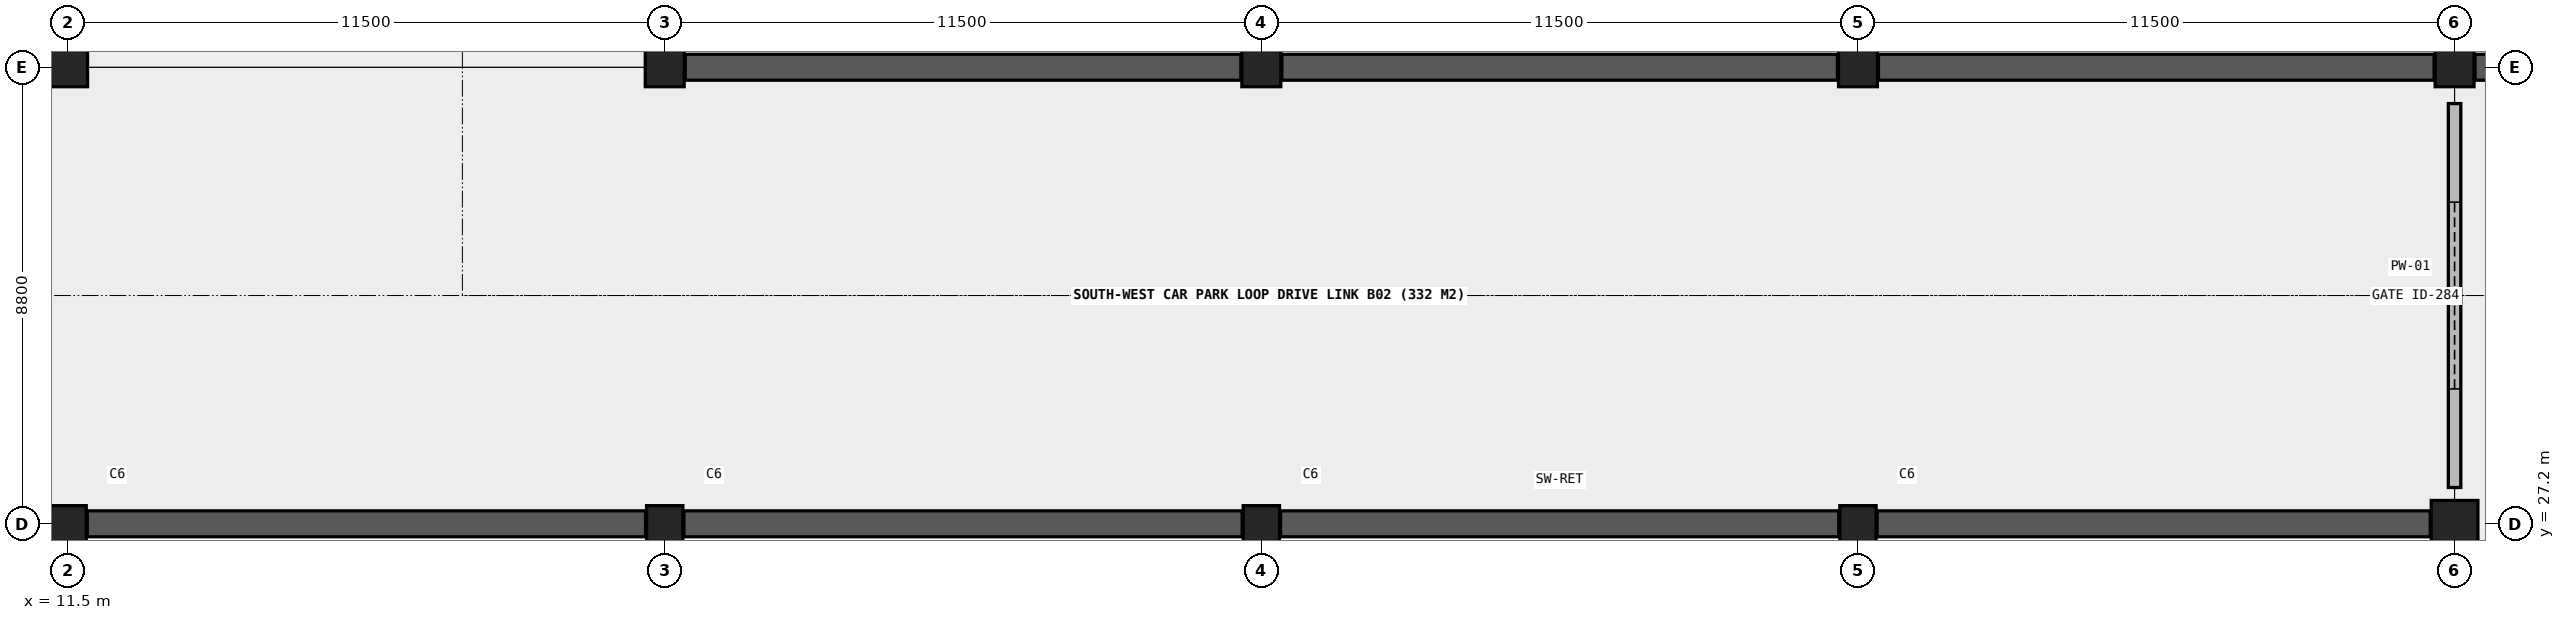
"""IFC4 building model, lengths in metres.
Left out: names, types, materials, properties, quantities, classifications, styles, units other than length and angle.
Written with IfcOpenShell. Run it as: python <this file> out.ifc"""

import sys

from ifc_helpers import new_model, si_unit, direction, frame, frame_2d, origin, origin_2d, place, context, subcontext, project, spatial, rectangle, circle, extrude, element, fill, save


model = new_model("IFC4")
c1 = context("Model", 3, precision=1e-05, world=origin(), true_north=direction((0.0, 1.0)))
c2 = subcontext(c1, "Body", "Model", "MODEL_VIEW")
j1 = project(units=[si_unit("LENGTHUNIT", "METRE"), si_unit("PLANEANGLEUNIT", "RADIAN")], contexts=[c1])
p1 = place(None, origin())
s1 = spatial("IfcSite", under=j1, at=p1, CompositionType="ELEMENT")
p2 = place(p1, origin())
s2 = spatial("IfcBuilding", under=s1, at=p2, CompositionType="ELEMENT")
p3 = place(p2, frame((0.0, 0.0, -8.4)))
s3 = spatial("IfcBuildingStorey", under=s2, at=p3, CompositionType="ELEMENT", Elevation=-8.4)
p4 = place(p3, frame((11.5, 27.2, 0.0), z_axis=(0.0, 0.0, 1.0), x_axis=(1.0, 0.0, 0.0)))
e1 = element("IfcColumn", 1, at=p4, inside=s3, PredefinedType="COLUMN", context=c2, shape_type="SweptSolid", body=[
    extrude(rectangle(XDim=0.7, YDim=0.7, at=origin_2d()), origin(), (0.0, 0.0, 1.0), 4.2),
])
p5 = place(p3, frame((11.5, 36.0, 0.0), z_axis=(0.0, 0.0, 1.0), x_axis=(1.0, 0.0, 0.0)))
e2 = element("IfcColumn", 2, at=p5, inside=s3, PredefinedType="COLUMN", context=c2, shape_type="SweptSolid", body=[
    extrude(rectangle(XDim=0.75, YDim=0.75, at=origin_2d()), origin(), (0.0, 0.0, 1.0), 4.2),
])
p6 = place(p3, frame((23.0, 27.2, 0.0), z_axis=(0.0, 0.0, 1.0), x_axis=(1.0, 0.0, 0.0)))
e3 = element("IfcColumn", 3, at=p6, inside=s3, PredefinedType="COLUMN", context=c2, shape_type="SweptSolid", body=[
    extrude(rectangle(XDim=0.7, YDim=0.7, at=origin_2d()), origin(), (0.0, 0.0, 1.0), 4.2),
])
p7 = place(p3, frame((23.0, 36.0, 0.0), z_axis=(0.0, 0.0, 1.0), x_axis=(1.0, 0.0, 0.0)))
e4 = element("IfcColumn", 4, at=p7, inside=s3, PredefinedType="COLUMN", context=c2, shape_type="SweptSolid", body=[
    extrude(rectangle(XDim=0.75, YDim=0.75, at=origin_2d()), origin(), (0.0, 0.0, 1.0), 4.2),
])
p8 = place(p3, frame((34.5, 27.2, 0.0), z_axis=(0.0, 0.0, 1.0), x_axis=(1.0, 0.0, 0.0)))
e5 = element("IfcColumn", 5, at=p8, inside=s3, PredefinedType="COLUMN", context=c2, shape_type="SweptSolid", body=[
    extrude(rectangle(XDim=0.7, YDim=0.7, at=origin_2d()), origin(), (0.0, 0.0, 1.0), 4.2),
])
p9 = place(p3, frame((34.5, 36.0, 0.0), z_axis=(0.0, 0.0, 1.0), x_axis=(1.0, 0.0, 0.0)))
e6 = element("IfcColumn", 6, at=p9, inside=s3, PredefinedType="COLUMN", context=c2, shape_type="SweptSolid", body=[
    extrude(rectangle(XDim=0.75, YDim=0.75, at=origin_2d()), origin(), (0.0, 0.0, 1.0), 4.2),
])
p10 = place(p3, frame((46.0, 27.2, 0.0), z_axis=(0.0, 0.0, 1.0), x_axis=(1.0, 0.0, 0.0)))
e7 = element("IfcColumn", 7, at=p10, inside=s3, PredefinedType="COLUMN", context=c2, shape_type="SweptSolid", body=[
    extrude(rectangle(XDim=0.7, YDim=0.7, at=origin_2d()), origin(), (0.0, 0.0, 1.0), 4.2),
])
p11 = place(p3, frame((46.0, 36.0, 0.0), z_axis=(0.0, 0.0, 1.0), x_axis=(1.0, 0.0, 0.0)))
e8 = element("IfcColumn", 8, at=p11, inside=s3, PredefinedType="COLUMN", context=c2, shape_type="SweptSolid", body=[
    extrude(rectangle(XDim=0.75, YDim=0.75, at=origin_2d()), origin(), (0.0, 0.0, 1.0), 4.2),
])
p12 = place(p3, frame((57.5, 27.2, 0.0), z_axis=(0.0, 0.0, 1.0), x_axis=(1.0, 0.0, 0.0)))
e9 = element("IfcColumn", 9, at=p12, inside=s3, PredefinedType="COLUMN", context=c2, shape_type="SweptSolid", body=[
    extrude(circle(Radius=0.45, at=origin_2d()), origin(), (0.0, 0.0, 1.0), 4.2),
])
p13 = place(p3, frame((57.5, 36.0, 0.0), z_axis=(0.0, 0.0, 1.0), x_axis=(1.0, 0.0, 0.0)))
e10 = element("IfcColumn", 10, at=p13, inside=s3, PredefinedType="COLUMN", context=c2, shape_type="SweptSolid", body=[
    extrude(rectangle(XDim=0.75, YDim=0.75, at=origin_2d()), origin(), (0.0, 0.0, 1.0), 4.2),
])
for number, where, z_axis, x_axis in (
    (11, (11.87, 27.2, 0.0), (0.0, 0.0, 1.0), (1.0, 0.0, 0.0)),
    (12, (23.37, 27.2, 0.0), (0.0, 0.0, 1.0), (1.0, 0.0, 0.0)),
    (13, (34.87, 27.2, 0.0), (0.0, 0.0, 1.0), (1.0, 0.0, 0.0)),
):
    element("IfcWall", number, at=place(p3, frame(where, z_axis=z_axis, x_axis=x_axis)), inside=s3, PredefinedType="SHEAR", context=c2, shape_type="SweptSolid", body=[
        extrude(rectangle(XDim=10.76, YDim=0.5, at=frame_2d((5.38, 0.0))), origin(), (0.0, 0.0, 1.0), 4.2),
    ])
p14 = place(p3, frame((46.37, 27.2, 0.0), z_axis=(0.0, 0.0, 1.0), x_axis=(1.0, 0.0, 0.0)))
e14 = element("IfcWall", 14, at=p14, inside=s3, PredefinedType="SHEAR", context=c2, shape_type="SweptSolid", body=[
    extrude(rectangle(XDim=10.66, YDim=0.5, at=frame_2d((5.33, 0.0))), origin(), (0.0, 0.0, 1.0), 4.2),
])
for number, where, z_axis, x_axis in (
    (15, (23.395, 36.0, 0.0), (0.0, 0.0, 1.0), (1.0, 0.0, 0.0)),
    (16, (34.895, 36.0, 0.0), (0.0, 0.0, 1.0), (1.0, 0.0, 0.0)),
    (17, (46.395, 36.0, 0.0), (0.0, 0.0, 1.0), (1.0, 0.0, 0.0)),
    (18, (57.895, 36.0, 0.0), (0.0, 0.0, 1.0), (1.0, 0.0, 0.0)),
):
    element("IfcWall", number, at=place(p3, frame(where, z_axis=z_axis, x_axis=x_axis)), inside=s3, PredefinedType="SHEAR", context=c2, shape_type="SweptSolid", body=[
        extrude(rectangle(XDim=10.71, YDim=0.5, at=frame_2d((5.355, 0.0))), origin(), (0.0, 0.0, 1.0), 4.2),
    ])
p15 = place(p3, frame((57.5, 27.9, 0.0), z_axis=(0.0, 0.0, 1.0), x_axis=(0.0, 1.0, 0.0)))
e19 = element("IfcWall", 19, at=p15, inside=s3, PredefinedType="SOLIDWALL", context=c2, shape_type="SweptSolid", body=[
    extrude(rectangle(XDim=7.4, YDim=0.24, at=frame_2d((3.7, 0.0))), origin(), (0.0, 0.0, 1.0), 3.02),
])
p16 = place(p15, frame((1.9, 0.0, 0.0)))
e20 = element("IfcOpeningElement", 20, at=p16, cuts=e19, PredefinedType="OPENING", context=c2, shape_type="SweptSolid", body=[
    extrude(rectangle(XDim=3.6, YDim=2.8, at=frame_2d((1.8, 1.4))), frame((0.0, 0.13, 0.0), z_axis=(0.0, -1.0, 0.0), x_axis=(1.0, 0.0, 0.0)), (0.0, 0.0, 1.0), 0.26),
])
p17 = place(p16, origin())
e21 = element("IfcDoor", 21, at=p17, inside=s3, OperationType="ROLLINGUP", PredefinedType="GATE", context=c2, shape_type="SweptSolid", body=[
    extrude(rectangle(XDim=3.6, YDim=2.8, at=frame_2d((1.8, 1.4))), frame((0.0, 0.025, 0.0), z_axis=(0.0, -1.0, 0.0), x_axis=(1.0, 0.0, 0.0)), (0.0, 0.0, 1.0), 0.05),
])
fill(e20, e21)
save(model, sys.argv[1])
